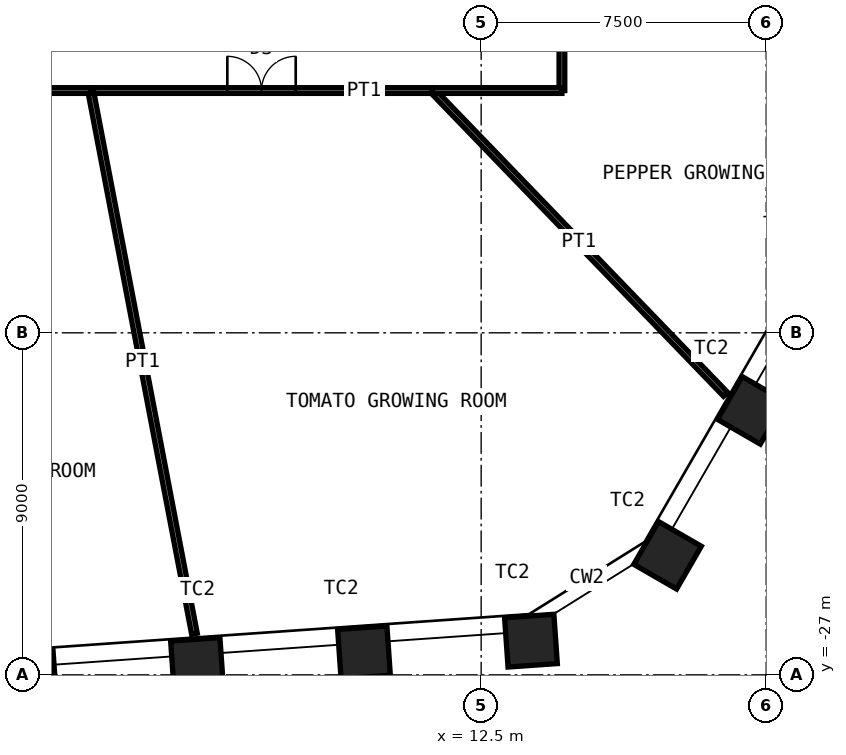
"""IFC4 building model, lengths in metres.
Left out: names, types, materials, properties, quantities, classifications, styles, units other than length and angle.
Written with IfcOpenShell. Run it as: python <this file> out.ifc"""

import sys

from ifc_helpers import new_model, si_unit, direction, frame, frame_2d, origin, origin_2d, place, context, subcontext, project, spatial, rectangle, hollow_rectangle, extrude, element, fill, save


model = new_model("IFC4")
c1 = context("Model", 3, precision=1e-05, world=origin(), true_north=direction((0.0, 1.0)))
c2 = subcontext(c1, "Body", "Model", "MODEL_VIEW")
j1 = project(units=[si_unit("LENGTHUNIT", "METRE"), si_unit("PLANEANGLEUNIT", "RADIAN")], contexts=[c1])
p1 = place(None, origin())
s1 = spatial("IfcSite", under=j1, at=p1, CompositionType="ELEMENT")
p2 = place(p1, origin())
s2 = spatial("IfcBuilding", under=s1, at=p2, CompositionType="ELEMENT")
p3 = place(p2, frame((0.0, 0.0, 77.0)))
s3 = spatial("IfcBuildingStorey", under=s2, at=p3, CompositionType="ELEMENT", Elevation=77.0)
for number, where, z_axis, x_axis in (
    (1, (19.607, -20.04, 0.0), (0.0, 0.0, 1.0), (0.5, 0.866, 0.0)),
    (2, (17.405, -23.854, 0.0), (0.0, 0.0, 1.0), (0.5, 0.866, 0.0)),
    (3, (13.811, -26.1, 0.0), (0.0, 0.0, 1.0), (0.998, 0.07, 0.0)),
    (4, (9.417, -26.407, 0.0), (0.0, 0.0, 1.0), (0.998, 0.07, 0.0)),
    (5, (5.023, -26.715, 0.0), (0.0, 0.0, 1.0), (0.998, 0.07, 0.0)),
    (6, (0.629, -27.022, 0.0), (0.0, 0.0, 1.0), (0.998, 0.07, 0.0)),
):
    element("IfcColumn", number, at=place(p3, frame(where, z_axis=z_axis, x_axis=x_axis)), inside=s3, PredefinedType="COLUMN", context=c2, shape_type="SweptSolid", body=[
        extrude(hollow_rectangle(XDim=1.3, YDim=1.3, WallThickness=0.1, at=origin_2d()), origin(), (0.0, 0.0, 1.0), 5.0),
    ])
p4 = place(p3, frame((18.931, -19.618, 0.0), z_axis=(0.0, 0.0, 1.0), x_axis=(-0.694400324326, 0.719588903178, 0.0)))
e7 = element("IfcWall", 7, at=p4, inside=s3, PredefinedType="PARTITIONING", context=c2, shape_type="SweptSolid", body=[
    extrude(rectangle(XDim=11.108, YDim=0.15, at=frame_2d((5.554, 0.0))), origin(), (0.0, 0.0, 1.0), 3.7),
])
p5 = place(p3, frame((11.218, -11.625, 0.0), z_axis=(0.0, 0.0, 1.0), x_axis=(-1.0, 0.0, 0.0)))
e8 = element("IfcWall", 8, at=p5, inside=s3, PredefinedType="PARTITIONING", context=c2, shape_type="SweptSolid", body=[
    extrude(rectangle(XDim=8.996, YDim=0.15, at=frame_2d((4.498, 0.0))), origin(), (0.0, 0.0, 1.0), 4.8),
])
p6 = place(p5, frame((3.598, 0.0, 0.0)))
e9 = element("IfcOpeningElement", 9, at=p6, cuts=e8, PredefinedType="OPENING", context=c2, shape_type="SweptSolid", body=[
    extrude(rectangle(XDim=1.8, YDim=2.4, at=frame_2d((0.9, 1.2))), frame((0.0, 0.085, 0.0), z_axis=(0.0, -1.0, 0.0), x_axis=(1.0, 0.0, 0.0)), (0.0, 0.0, 1.0), 0.17),
])
p7 = place(p3, frame((4.955, -25.918, 0.0), z_axis=(0.0, 0.0, 1.0), x_axis=(-0.187785090129, 0.98221014041, 0.0)))
e10 = element("IfcWall", 10, at=p7, inside=s3, PredefinedType="PARTITIONING", context=c2, shape_type="SweptSolid", body=[
    extrude(rectangle(XDim=14.552, YDim=0.15, at=frame_2d((7.276, 0.0))), origin(), (0.0, 0.0, 1.0), 3.7),
])
p8 = place(p3, frame((2.222, -11.625, 0.0), z_axis=(0.0, 0.0, 1.0), x_axis=(-1.0, 0.0, 0.0)))
e11 = element("IfcWall", 11, at=p8, inside=s3, PredefinedType="PARTITIONING", context=c2, shape_type="SweptSolid", body=[
    extrude(rectangle(XDim=5.764, YDim=0.15, at=frame_2d((2.882, 0.0))), origin(), (0.0, 0.0, 1.0), 4.8),
])
p9 = place(p8, frame((1.982, 0.0, 0.0)))
e12 = element("IfcOpeningElement", 12, at=p9, cuts=e11, PredefinedType="OPENING", context=c2, shape_type="SweptSolid", body=[
    extrude(rectangle(XDim=1.8, YDim=2.4, at=frame_2d((0.9, 1.2))), frame((0.0, 0.085, 0.0), z_axis=(0.0, -1.0, 0.0), x_axis=(1.0, 0.0, 0.0)), (0.0, 0.0, 1.0), 0.17),
])
p10 = place(p3, frame((23.316, -12.015, 0.0), z_axis=(0.0, 0.0, 1.0), x_axis=(-0.888917561609, 0.458067209767, 0.0)))
e13 = element("IfcWall", 13, at=p10, inside=s3, PredefinedType="PARTITIONING", context=c2, shape_type="SweptSolid", body=[
    extrude(rectangle(XDim=9.778, YDim=0.15, at=frame_2d((4.889, 0.0))), origin(), (0.0, 0.0, 1.0), 3.7),
])
p11 = place(p3, frame((14.625, -7.536, 0.0), z_axis=(0.0, 0.0, 1.0), x_axis=(0.0, -1.0, 0.0)))
e14 = element("IfcWall", 14, at=p11, inside=s3, PredefinedType="PARTITIONING", context=c2, shape_type="SweptSolid", body=[
    extrude(rectangle(XDim=4.089, YDim=0.15, at=frame_2d((2.044, 0.0))), origin(), (0.0, 0.0, 1.0), 4.8),
])
p12 = place(p11, frame((1.544, 0.0, 0.0)))
e15 = element("IfcOpeningElement", 15, at=p12, cuts=e14, PredefinedType="OPENING", context=c2, shape_type="SweptSolid", body=[
    extrude(rectangle(XDim=1.0, YDim=2.4, at=frame_2d((0.5, 1.2))), frame((0.0, 0.085, 0.0), z_axis=(0.0, -1.0, 0.0), x_axis=(1.0, 0.0, 0.0)), (0.0, 0.0, 1.0), 0.17),
])
p13 = place(p3, frame((14.625, -11.625, 0.0), z_axis=(0.0, 0.0, 1.0), x_axis=(-1.0, 0.0, 0.0)))
e16 = element("IfcWall", 16, at=p13, inside=s3, PredefinedType="PARTITIONING", context=c2, shape_type="SweptSolid", body=[
    extrude(rectangle(XDim=3.407, YDim=0.15, at=frame_2d((1.704, 0.0))), origin(), (0.0, 0.0, 1.0), 4.8),
])
p14 = place(p6, origin())
e17 = element("IfcDoor", 17, at=p14, inside=s3, OperationType="DOUBLE_DOOR_DOUBLE_SWING", PredefinedType="DOOR", context=c2, shape_type="SweptSolid", body=[
    extrude(rectangle(XDim=1.8, YDim=2.4, at=frame_2d((0.9, 1.2))), frame((0.0, 0.025, 0.0), z_axis=(0.0, -1.0, 0.0), x_axis=(1.0, 0.0, 0.0)), (0.0, 0.0, 1.0), 0.05),
])
fill(e9, e17)
save(model, sys.argv[1])
